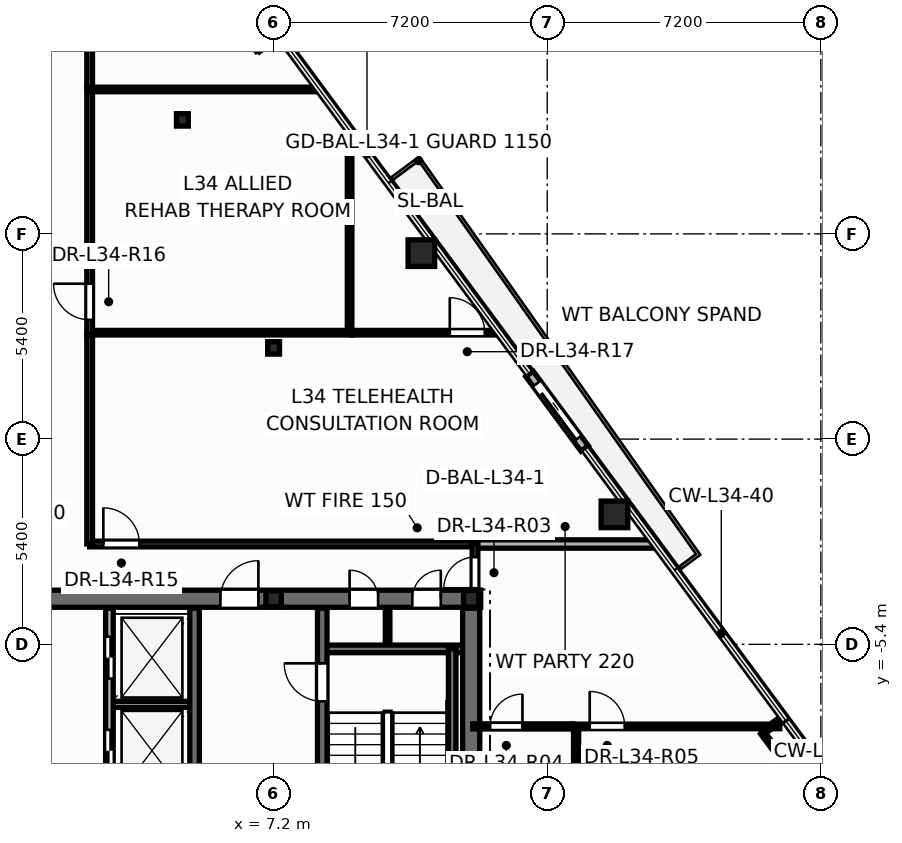
"""IFC4 building model, lengths in metres.
Left out: names, types, materials, properties, quantities, classifications, styles, units other than length and angle.
Written with IfcOpenShell. Run it as: python <this file> out.ifc"""

import sys

from ifc_helpers import new_model, si_unit, direction, frame, frame_2d, origin, origin_2d, place, context, subcontext, project, spatial, rectangle, hollow_circle, i_section, extrude, element, fill, save


model = new_model("IFC4")
c1 = context("Model", 3, precision=1e-05, world=origin(), true_north=direction((0.0, 1.0)))
c2 = subcontext(c1, "Body", "Model", "MODEL_VIEW")
j1 = project(units=[si_unit("LENGTHUNIT", "METRE"), si_unit("PLANEANGLEUNIT", "RADIAN")], contexts=[c1])
p1 = place(None, origin())
s1 = spatial("IfcSite", under=j1, at=p1, CompositionType="ELEMENT")
p2 = place(p1, origin())
s2 = spatial("IfcBuilding", under=s1, at=p2, CompositionType="ELEMENT")
p3 = place(p2, frame((0.0, 0.0, 132.9)))
s3 = spatial("IfcBuildingStorey", under=s2, at=p3, CompositionType="ELEMENT", Elevation=132.9)
for number, where, z_axis, x_axis in (
    (1, (16.169, -1.98, 0.0), (0.0, 0.0, 1.0), (1.0, 0.0, 0.0)),
    (2, (11.089, 4.894, 0.0), (0.0, 0.0, 1.0), (1.0, 0.0, 0.0)),
):
    element("IfcColumn", number, at=place(p3, frame(where, z_axis=z_axis, x_axis=x_axis)), inside=s3, PredefinedType="COLUMN", context=c2, shape_type="SweptSolid", body=[
        extrude(hollow_circle(Radius=0.35, WallThickness=0.03, at=origin_2d()), origin(), (0.0, 0.0, 1.0), 3.6),
    ])
p4 = place(p3, frame((12.4, -4.2, 0.0), z_axis=(0.0, 0.0, 1.0), x_axis=(1.0, 0.0, 0.0)))
e3 = element("IfcColumn", 3, at=p4, inside=s3, PredefinedType="COLUMN", context=c2, shape_type="SweptSolid", body=[
    extrude(i_section(OverallWidth=0.4, OverallDepth=0.44, WebThickness=0.028, FlangeThickness=0.04, at=origin_2d()), origin(), (0.0, 0.0, 1.0), 3.6),
])
p5 = place(p3, frame((7.2, -4.2, 0.0), z_axis=(0.0, 0.0, 1.0), x_axis=(1.0, 0.0, 0.0)))
e4 = element("IfcColumn", 4, at=p5, inside=s3, PredefinedType="PILASTER", context=c2, shape_type="SweptSolid", body=[
    extrude(i_section(OverallWidth=0.405, OverallDepth=0.414, WebThickness=0.022, FlangeThickness=0.032, at=origin_2d()), origin(), (0.0, 0.0, 1.0), 3.6),
])
for number, where, z_axis, x_axis in (
    (5, (7.2, 2.4, 0.0), (0.0, 0.0, 1.0), (1.0, 0.0, 0.0)),
    (6, (4.8, 8.4, 0.0), (0.0, 0.0, 1.0), (1.0, 0.0, 0.0)),
):
    element("IfcColumn", number, at=place(p3, frame(where, z_axis=z_axis, x_axis=x_axis)), inside=s3, PredefinedType="COLUMN", context=c2, shape_type="SweptSolid", body=[
        extrude(i_section(OverallWidth=0.311, OverallDepth=0.327, WebThickness=0.016, FlangeThickness=0.025, at=origin_2d()), origin(), (0.0, 0.0, 1.0), 3.6),
    ])
p6 = place(p3, frame((15.384, -0.246, -0.015), z_axis=(0.0, 0.0, 1.0), x_axis=(-0.594317914364, 0.804230201289, 0.0)))
e7 = element("IfcWall", 7, at=p6, inside=s3, PredefinedType="STANDARD", context=c2, shape_type="SweptSolid", body=[
    extrude(rectangle(XDim=2.44, YDim=0.24, at=frame_2d((1.22, 0.0))), origin(), (0.0, 0.0, 1.0), 2.807),
])
p7 = place(p6, frame((0.32, 0.0, 0.015)))
e8 = element("IfcOpeningElement", 8, at=p7, cuts=e7, PredefinedType="OPENING", context=c2, shape_type="SweptSolid", body=[
    extrude(rectangle(XDim=1.806, YDim=2.204, at=frame_2d((0.9, 1.102))), frame((0.0, 0.13, 0.0), z_axis=(0.0, -1.0, 0.0), x_axis=(1.0, 0.0, 0.0)), (0.0, 0.0, 1.0), 0.26),
])
p8 = place(p3, frame((2.88, -6.98, 0.0), z_axis=(0.0, 0.0, 1.0), x_axis=(1.0, 0.0, 0.0)))
e9 = element("IfcWall", 9, at=p8, inside=s3, PredefinedType="PARTITIONING", context=c2, shape_type="SweptSolid", body=[
    extrude(rectangle(XDim=2.24, YDim=0.16, at=frame_2d((1.12, 0.0))), origin(), (0.0, 0.0, 1.0), 3.35),
])
p9 = place(p3, frame((10.2, -5.52, 0.0), z_axis=(0.0, 0.0, 1.0), x_axis=(0.0, 1.0, 0.0)))
e10 = element("IfcWall", 10, at=p9, inside=s3, PredefinedType="PARTITIONING", context=c2, shape_type="SweptSolid", body=[
    extrude(rectangle(XDim=1.12, YDim=0.12, at=frame_2d((0.56, 0.0))), origin(), (0.0, 0.0, 1.0), 3.35),
])
p10 = place(p3, frame((-12.65, -4.2, 0.0), z_axis=(0.0, 0.0, 1.0), x_axis=(1.0, 0.0, 0.0)))
e11 = element("IfcWall", 11, at=p10, inside=s3, PredefinedType="SHEAR", context=c2, shape_type="SweptSolid", body=[
    extrude(rectangle(XDim=25.3, YDim=0.45, at=frame_2d((12.65, 0.0))), origin(), (0.0, 0.0, 1.0), 3.6),
])
p11 = place(p10, frame((1.85, 0.0, 0.0)))
e12 = element("IfcOpeningElement", 12, at=p11, cuts=e11, PredefinedType="OPENING", context=c2, shape_type="SweptSolid", body=[
    extrude(rectangle(XDim=0.756, YDim=2.054, at=frame_2d((0.375, 1.027))), frame((0.0, 0.235, 0.0), z_axis=(0.0, -1.0, 0.0), x_axis=(1.0, 0.0, 0.0)), (0.0, 0.0, 1.0), 0.47),
])
p12 = place(p10, frame((21.85, 0.0, 0.0)))
e13 = element("IfcOpeningElement", 13, at=p12, cuts=e11, PredefinedType="OPENING", context=c2, shape_type="SweptSolid", body=[
    extrude(rectangle(XDim=0.756, YDim=2.054, at=frame_2d((0.375, 1.027))), frame((0.0, 0.235, 0.0), z_axis=(0.0, -1.0, 0.0), x_axis=(1.0, 0.0, 0.0)), (0.0, 0.0, 1.0), 0.47),
])
p13 = place(p10, frame((23.5, 0.0, 0.0)))
e14 = element("IfcOpeningElement", 14, at=p13, cuts=e11, PredefinedType="OPENING", context=c2, shape_type="SweptSolid", body=[
    extrude(rectangle(XDim=0.756, YDim=2.054, at=frame_2d((0.375, 1.027))), frame((0.0, 0.235, 0.0), z_axis=(0.0, -1.0, 0.0), x_axis=(1.0, 0.0, 0.0)), (0.0, 0.0, 1.0), 0.47),
])
p14 = place(p10, frame((5.85, 0.0, 0.0)))
e15 = element("IfcOpeningElement", 15, at=p14, cuts=e11, PredefinedType="OPENING", context=c2, shape_type="SweptSolid", body=[
    extrude(rectangle(XDim=1.006, YDim=2.104, at=frame_2d((0.5, 1.052))), frame((0.0, 0.235, 0.0), z_axis=(0.0, -1.0, 0.0), x_axis=(1.0, 0.0, 0.0)), (0.0, 0.0, 1.0), 0.47),
])
p15 = place(p10, frame((10.35, 0.0, 0.0)))
e16 = element("IfcOpeningElement", 16, at=p15, cuts=e11, PredefinedType="OPENING", context=c2, shape_type="SweptSolid", body=[
    extrude(rectangle(XDim=1.406, YDim=2.154, at=frame_2d((0.7, 1.077))), frame((0.0, 0.235, 0.0), z_axis=(0.0, -1.0, 0.0), x_axis=(1.0, 0.0, 0.0)), (0.0, 0.0, 1.0), 0.47),
])
p16 = place(p10, frame((18.45, 0.0, 0.0)))
e17 = element("IfcOpeningElement", 17, at=p16, cuts=e11, PredefinedType="OPENING", context=c2, shape_type="SweptSolid", body=[
    extrude(rectangle(XDim=1.006, YDim=2.104, at=frame_2d((0.5, 1.052))), frame((0.0, 0.235, 0.0), z_axis=(0.0, -1.0, 0.0), x_axis=(1.0, 0.0, 0.0)), (0.0, 0.0, 1.0), 0.47),
])
p17 = place(p3, frame((8.48, -5.52, 0.0), z_axis=(0.0, 0.0, 1.0), x_axis=(1.0, 0.0, 0.0)))
e18 = element("IfcWall", 18, at=p17, inside=s3, PredefinedType="SOLIDWALL", context=c2, shape_type="SweptSolid", body=[
    extrude(rectangle(XDim=3.87, YDim=0.2, at=frame_2d((1.935, 0.0))), origin(), (0.0, 0.0, 1.0), 3.6),
])
p18 = place(p3, frame((11.9, -13.1, 0.0), z_axis=(0.0, 0.0, 1.0), x_axis=(0.0, 1.0, 0.0)))
e19 = element("IfcWall", 19, at=p18, inside=s3, PredefinedType="SOLIDWALL", context=c2, shape_type="SweptSolid", body=[
    extrude(rectangle(XDim=7.58, YDim=0.2, at=frame_2d((3.79, 0.0))), origin(), (0.0, 0.0, 1.0), 3.6),
])
p19 = place(p3, frame((8.48, -13.85, 0.0), z_axis=(0.0, 0.0, 1.0), x_axis=(0.0, 1.0, 0.0)))
e20 = element("IfcWall", 20, at=p19, inside=s3, PredefinedType="SHEAR", context=c2, shape_type="SweptSolid", body=[
    extrude(rectangle(XDim=9.4, YDim=0.25, at=frame_2d((4.7, 0.0))), origin(), (0.0, 0.0, 1.0), 3.6),
])
p20 = place(p19, frame((6.95, 0.0, 0.0)))
e21 = element("IfcOpeningElement", 21, at=p20, cuts=e20, PredefinedType="OPENING", context=c2, shape_type="SweptSolid", body=[
    extrude(rectangle(XDim=1.006, YDim=2.104, at=frame_2d((0.5, 1.052))), frame((0.0, 0.135, 0.0), z_axis=(0.0, -1.0, 0.0), x_axis=(1.0, 0.0, 0.0)), (0.0, 0.0, 1.0), 0.27),
])
p21 = place(p3, frame((5.12, -13.85, 0.0), z_axis=(0.0, 0.0, 1.0), x_axis=(0.0, 1.0, 0.0)))
e22 = element("IfcWall", 22, at=p21, inside=s3, PredefinedType="SHEAR", context=c2, shape_type="SweptSolid", body=[
    extrude(rectangle(XDim=9.4, YDim=0.25, at=frame_2d((4.7, 0.0))), origin(), (0.0, 0.0, 1.0), 3.6),
])
p22 = place(p3, frame((12.4, -13.85, 0.0), z_axis=(0.0, 0.0, 1.0), x_axis=(0.0, 1.0, 0.0)))
e23 = element("IfcWall", 23, at=p22, inside=s3, PredefinedType="SHEAR", context=c2, shape_type="SweptSolid", body=[
    extrude(rectangle(XDim=9.4, YDim=0.45, at=frame_2d((4.7, 0.0))), origin(), (0.0, 0.0, 1.0), 3.6),
])
p23 = place(p3, frame((2.88, -9.45, 0.0), z_axis=(0.0, 0.0, 1.0), x_axis=(0.0, 1.0, 0.0)))
e24 = element("IfcWall", 24, at=p23, inside=s3, PredefinedType="SOLIDWALL", context=c2, shape_type="SweptSolid", body=[
    extrude(rectangle(XDim=5.0, YDim=0.2, at=frame_2d((2.5, 0.0))), origin(), (0.0, 0.0, 1.0), 3.35),
])
p24 = place(p23, frame((0.7, 0.0, 0.0)))
e25 = element("IfcOpeningElement", 25, at=p24, cuts=e24, PredefinedType="OPENING", context=c2, shape_type="SweptSolid", body=[
    extrude(rectangle(XDim=1.106, YDim=2.104, at=frame_2d((0.55, 1.052))), frame((0.0, 0.11, 0.0), z_axis=(0.0, -1.0, 0.0), x_axis=(1.0, 0.0, 0.0)), (0.0, 0.0, 1.0), 0.22),
])
p25 = place(p23, frame((3.15, 0.0, 0.0)))
e26 = element("IfcOpeningElement", 26, at=p25, cuts=e24, PredefinedType="OPENING", context=c2, shape_type="SweptSolid", body=[
    extrude(rectangle(XDim=1.106, YDim=2.104, at=frame_2d((0.55, 1.052))), frame((0.0, 0.11, 0.0), z_axis=(0.0, -1.0, 0.0), x_axis=(1.0, 0.0, 0.0)), (0.0, 0.0, 1.0), 0.22),
])
p26 = place(p3, frame((2.36, -2.76, 0.0), z_axis=(0.0, 0.0, 1.0), x_axis=(1.0, 0.0, 0.0)))
e27 = element("IfcWall", 27, at=p26, inside=s3, PredefinedType="PARTITIONING", context=c2, shape_type="SweptSolid", body=[
    extrude(rectangle(XDim=10.14, YDim=0.15, at=frame_2d((5.07, 0.0))), origin(), (0.0, 0.0, 1.0), 2.325),
])
p27 = place(p26, frame((0.36, 0.0, 0.0)))
e28 = element("IfcOpeningElement", 28, at=p27, cuts=e27, PredefinedType="OPENING", context=c2, shape_type="SweptSolid", body=[
    extrude(rectangle(XDim=0.956, YDim=2.104, at=frame_2d((0.475, 1.052))), frame((0.0, 0.085, 0.0), z_axis=(0.0, -1.0, 0.0), x_axis=(1.0, 0.0, 0.0)), (0.0, 0.0, 1.0), 0.17),
])
p28 = place(p3, frame((2.36, 2.8, 0.0), z_axis=(0.0, 0.0, 1.0), x_axis=(1.0, 0.0, 0.0)))
e29 = element("IfcWall", 29, at=p28, inside=s3, PredefinedType="PARTITIONING", context=c2, shape_type="SweptSolid", body=[
    extrude(rectangle(XDim=6.9, YDim=0.12, at=frame_2d((3.45, 0.0))), origin(), (0.0, 0.0, 1.0), 2.617),
])
p29 = place(p3, frame((2.36, 2.74, 0.0), z_axis=(0.0, 0.0, 1.0), x_axis=(0.0, 1.0, 0.0)))
e30 = element("IfcWall", 30, at=p29, inside=s3, PredefinedType="PARTITIONING", context=c2, shape_type="SweptSolid", body=[
    extrude(rectangle(XDim=6.52, YDim=0.15, at=frame_2d((3.26, 0.0))), origin(), (0.0, 0.0, 1.0), 2.617),
])
p30 = place(p29, frame((0.398, 0.0, 0.0)))
e31 = element("IfcOpeningElement", 31, at=p30, cuts=e30, PredefinedType="OPENING", context=c2, shape_type="SweptSolid", body=[
    extrude(rectangle(XDim=0.956, YDim=2.104, at=frame_2d((0.475, 1.052))), frame((0.0, 0.085, 0.0), z_axis=(0.0, -1.0, 0.0), x_axis=(1.0, 0.0, 0.0)), (0.0, 0.0, 1.0), 0.17),
])
p31 = place(p3, frame((2.36, 9.2, 0.0), z_axis=(0.0, 0.0, 1.0), x_axis=(1.0, 0.0, 0.0)))
e32 = element("IfcWall", 32, at=p31, inside=s3, PredefinedType="PARTITIONING", context=c2, shape_type="SweptSolid", body=[
    extrude(rectangle(XDim=6.043, YDim=0.12, at=frame_2d((3.022, 0.0))), origin(), (0.0, 0.0, 1.0), 2.617),
])
p32 = place(p3, frame((2.36, -2.76, 0.0), z_axis=(0.0, 0.0, 1.0), x_axis=(0.0, 1.0, 0.0)))
e33 = element("IfcWall", 33, at=p32, inside=s3, PredefinedType="PARTITIONING", context=c2, shape_type="SweptSolid", body=[
    extrude(rectangle(XDim=5.498, YDim=0.15, at=frame_2d((2.749, 0.0))), origin(), (0.0, 0.0, 1.0), 2.325),
])
p33 = place(p3, frame((15.08, -7.56, 0.0), z_axis=(0.0, 0.0, 1.0), x_axis=(1.0, 0.0, 0.0)))
e34 = element("IfcWall", 34, at=p33, inside=s3, PredefinedType="PARTITIONING", context=c2, shape_type="SweptSolid", body=[
    extrude(rectangle(XDim=5.44, YDim=0.12, at=frame_2d((2.72, 0.0))), origin(), (0.0, 0.0, 1.0), 2.325),
])
p34 = place(p33, frame((0.438, 0.0, 0.0)))
e35 = element("IfcOpeningElement", 35, at=p34, cuts=e34, PredefinedType="OPENING", context=c2, shape_type="SweptSolid", body=[
    extrude(rectangle(XDim=0.926, YDim=2.104, at=frame_2d((0.46, 1.052))), frame((0.0, 0.07, 0.0), z_axis=(0.0, -1.0, 0.0), x_axis=(1.0, 0.0, 0.0)), (0.0, 0.0, 1.0), 0.14),
])
p35 = place(p3, frame((9.2, 2.8, 0.0), z_axis=(0.0, 0.0, 1.0), x_axis=(0.0, 1.0, 0.0)))
e36 = element("IfcWall", 36, at=p35, inside=s3, PredefinedType="PARTITIONING", context=c2, shape_type="SweptSolid", body=[
    extrude(rectangle(XDim=5.322, YDim=0.12, at=frame_2d((2.661, 0.0))), origin(), (0.0, 0.0, 1.0), 2.617),
])
p36 = place(p3, frame((12.5, -2.76, 0.0), z_axis=(0.0, 0.0, 1.0), x_axis=(1.0, 0.0, 0.0)))
e37 = element("IfcWall", 37, at=p36, inside=s3, PredefinedType="PARTITIONING", context=c2, shape_type="SweptSolid", body=[
    extrude(rectangle(XDim=4.743, YDim=0.22, at=frame_2d((2.371, 0.0))), origin(), (0.0, 0.0, 1.0), 2.792),
])
p37 = place(p3, frame((2.36, 9.262, 0.0), z_axis=(0.0, 0.0, 1.0), x_axis=(0.0, 1.0, 0.0)))
e38 = element("IfcWall", 38, at=p37, inside=s3, PredefinedType="PARTITIONING", context=c2, shape_type="SweptSolid", body=[
    extrude(rectangle(XDim=4.052, YDim=0.15, at=frame_2d((2.026, 0.0))), origin(), (0.0, 0.0, 1.0), 2.792),
])
p38 = place(p3, frame((9.262, 2.8, 0.0), z_axis=(0.0, 0.0, 1.0), x_axis=(1.0, 0.0, 0.0)))
e39 = element("IfcWall", 39, at=p38, inside=s3, PredefinedType="PARTITIONING", context=c2, shape_type="SweptSolid", body=[
    extrude(rectangle(XDim=3.872, YDim=0.12, at=frame_2d((1.936, 0.0))), origin(), (0.0, 0.0, 1.0), 2.792),
])
p39 = place(p38, frame((2.574, 0.0, 0.0)))
e40 = element("IfcOpeningElement", 40, at=p39, cuts=e39, PredefinedType="OPENING", context=c2, shape_type="SweptSolid", body=[
    extrude(rectangle(XDim=0.926, YDim=2.104, at=frame_2d((0.46, 1.052))), frame((0.0, 0.07, 0.0), z_axis=(0.0, -1.0, 0.0), x_axis=(1.0, 0.0, 0.0)), (0.0, 0.0, 1.0), 0.14),
])
p40 = place(p3, frame((12.44, -7.56, 0.0), z_axis=(0.0, 0.0, 1.0), x_axis=(1.0, 0.0, 0.0)))
e41 = element("IfcWall", 41, at=p40, inside=s3, PredefinedType="PARTITIONING", context=c2, shape_type="SweptSolid", body=[
    extrude(rectangle(XDim=2.638, YDim=0.135, at=frame_2d((1.319, 0.0))), origin(), (0.0, 0.0, 1.0), 2.792),
])
p41 = place(p40, frame((0.458, 0.0, 0.0)))
e42 = element("IfcOpeningElement", 42, at=p41, cuts=e41, PredefinedType="OPENING", context=c2, shape_type="SweptSolid", body=[
    extrude(rectangle(XDim=0.856, YDim=2.104, at=frame_2d((0.425, 1.052))), frame((0.0, 0.078, 0.0), z_axis=(0.0, -1.0, 0.0), x_axis=(1.0, 0.0, 0.0)), (0.0, 0.0, 1.0), 0.155),
])
p42 = place(p3, frame((15.16, -10.3, 0.0), z_axis=(0.0, 0.0, 1.0), x_axis=(0.0, 1.0, 0.0)))
e43 = element("IfcWall", 43, at=p42, inside=s3, PredefinedType="PARTITIONING", context=c2, shape_type="SweptSolid", body=[
    extrude(rectangle(XDim=2.74, YDim=0.135, at=frame_2d((1.37, 0.0))), origin(), (0.0, 0.0, 1.0), 3.35),
])
p43 = place(p3, frame((21.464, -9.615, 0.0), z_axis=(0.0, 0.0, 1.0), x_axis=(-0.594385220585, 0.804180458324, 0.0)))
e44 = element("IfcWall", 44, at=p43, inside=s3, PredefinedType="PARTITIONING", context=c2, shape_type="SweptSolid", body=[
    extrude(rectangle(XDim=2.351, YDim=0.12, at=frame_2d((1.175, 0.0))), origin(), (0.0, 0.0, 1.0), 2.325),
])
p44 = place(p3, frame((12.5, -4.24, 0.0), z_axis=(0.0, 0.0, 1.0), x_axis=(0.0, 1.0, 0.0)))
e45 = element("IfcWall", 45, at=p44, inside=s3, PredefinedType="PARTITIONING", context=c2, shape_type="SweptSolid", body=[
    extrude(rectangle(XDim=1.48, YDim=0.15, at=frame_2d((0.74, 0.0))), origin(), (0.0, 0.0, 1.0), 2.325),
])
p45 = place(p44, frame((0.315, 0.0, 0.0)))
e46 = element("IfcOpeningElement", 46, at=p45, cuts=e45, PredefinedType="OPENING", context=c2, shape_type="SweptSolid", body=[
    extrude(rectangle(XDim=0.826, YDim=2.104, at=frame_2d((0.41, 1.052))), frame((0.0, 0.085, 0.0), z_axis=(0.0, -1.0, 0.0), x_axis=(1.0, 0.0, 0.0)), (0.0, 0.0, 1.0), 0.17),
])
p46 = place(p3, frame((20.066, -7.725, 0.0), z_axis=(0.0, 0.0, 1.0), x_axis=(0.804047409182, 0.594565188847, 0.0)))
e47 = element("IfcWall", 47, at=p46, inside=s3, PredefinedType="PARTITIONING", context=c2, shape_type="SweptSolid", body=[
    extrude(rectangle(XDim=0.67, YDim=0.12, at=frame_2d((0.335, 0.0))), origin(), (0.0, 0.0, 1.0), 2.792),
])
p47 = place(p7, origin())
e48 = element("IfcDoor", 48, at=p47, inside=s3, OperationType="SLIDING_TO_LEFT", PredefinedType="DOOR", context=c2, shape_type="SweptSolid", body=[
    extrude(rectangle(XDim=1.8, YDim=2.2, at=frame_2d((0.9, 1.1))), frame((0.0, 0.025, 0.0), z_axis=(0.0, -1.0, 0.0), x_axis=(1.0, 0.0, 0.0)), (0.0, 0.0, 1.0), 0.05),
])
fill(e8, e48)
p48 = place(p24, origin())
e49 = element("IfcDoor", 49, at=p48, inside=s3, OperationType="DOUBLE_DOOR_SLIDING", PredefinedType="DOOR", context=c2, shape_type="SweptSolid", body=[
    extrude(rectangle(XDim=1.1, YDim=2.1, at=frame_2d((0.55, 1.05))), frame((0.0, 0.025, 0.0), z_axis=(0.0, -1.0, 0.0), x_axis=(1.0, 0.0, 0.0)), (0.0, 0.0, 1.0), 0.05),
])
fill(e25, e49)
p49 = place(p25, origin())
e50 = element("IfcDoor", 50, at=p49, inside=s3, OperationType="DOUBLE_DOOR_SLIDING", PredefinedType="DOOR", context=c2, shape_type="SweptSolid", body=[
    extrude(rectangle(XDim=1.1, YDim=2.1, at=frame_2d((0.55, 1.05))), frame((0.0, 0.025, 0.0), z_axis=(0.0, -1.0, 0.0), x_axis=(1.0, 0.0, 0.0)), (0.0, 0.0, 1.0), 0.05),
])
fill(e26, e50)
p50 = place(p20, origin())
e51 = element("IfcDoor", 51, at=p50, inside=s3, OperationType="SINGLE_SWING_RIGHT", PredefinedType="DOOR", context=c2, shape_type="SweptSolid", body=[
    extrude(rectangle(XDim=1.0, YDim=2.1, at=frame_2d((0.5, 1.05))), frame((0.0, 0.025, 0.0), z_axis=(0.0, -1.0, 0.0), x_axis=(1.0, 0.0, 0.0)), (0.0, 0.0, 1.0), 0.05),
])
fill(e21, e51)
p51 = place(p12, origin())
e52 = element("IfcDoor", 52, at=p51, inside=s3, OperationType="SINGLE_SWING_LEFT", PredefinedType="DOOR", context=c2, shape_type="SweptSolid", body=[
    extrude(rectangle(XDim=0.75, YDim=2.05, at=frame_2d((0.375, 1.025))), frame((0.0, 0.025, 0.0), z_axis=(0.0, -1.0, 0.0), x_axis=(1.0, 0.0, 0.0)), (0.0, 0.0, 1.0), 0.05),
])
fill(e13, e52)
p52 = place(p13, origin())
e53 = element("IfcDoor", 53, at=p52, inside=s3, OperationType="SINGLE_SWING_RIGHT", PredefinedType="DOOR", context=c2, shape_type="SweptSolid", body=[
    extrude(rectangle(XDim=0.75, YDim=2.05, at=frame_2d((0.375, 1.025))), frame((0.0, 0.025, 0.0), z_axis=(0.0, -1.0, 0.0), x_axis=(1.0, 0.0, 0.0)), (0.0, 0.0, 1.0), 0.05),
])
fill(e14, e53)
p53 = place(p16, origin())
e54 = element("IfcDoor", 54, at=p53, inside=s3, OperationType="SINGLE_SWING_RIGHT", PredefinedType="DOOR", context=c2, shape_type="SweptSolid", body=[
    extrude(rectangle(XDim=1.0, YDim=2.1, at=frame_2d((0.5, 1.05))), frame((0.0, 0.025, 0.0), z_axis=(0.0, -1.0, 0.0), x_axis=(1.0, 0.0, 0.0)), (0.0, 0.0, 1.0), 0.05),
])
fill(e17, e54)
p54 = place(p45, origin())
e55 = element("IfcDoor", 55, at=p54, inside=s3, OperationType="SINGLE_SWING_LEFT", PredefinedType="DOOR", context=c2, shape_type="SweptSolid", body=[
    extrude(rectangle(XDim=0.82, YDim=2.1, at=frame_2d((0.41, 1.05))), frame((0.0, 0.025, 0.0), z_axis=(0.0, -1.0, 0.0), x_axis=(1.0, 0.0, 0.0)), (0.0, 0.0, 1.0), 0.05),
])
fill(e46, e55)
p55 = place(p41, origin())
e56 = element("IfcDoor", 56, at=p55, inside=s3, OperationType="SINGLE_SWING_RIGHT", PredefinedType="DOOR", context=c2, shape_type="SweptSolid", body=[
    extrude(rectangle(XDim=0.85, YDim=2.1, at=frame_2d((0.425, 1.05))), frame((0.0, 0.025, 0.0), z_axis=(0.0, -1.0, 0.0), x_axis=(1.0, 0.0, 0.0)), (0.0, 0.0, 1.0), 0.05),
])
fill(e42, e56)
p56 = place(p34, origin())
e57 = element("IfcDoor", 57, at=p56, inside=s3, OperationType="SINGLE_SWING_LEFT", PredefinedType="DOOR", context=c2, shape_type="SweptSolid", body=[
    extrude(rectangle(XDim=0.92, YDim=2.1, at=frame_2d((0.46, 1.05))), frame((0.0, 0.025, 0.0), z_axis=(0.0, -1.0, 0.0), x_axis=(1.0, 0.0, 0.0)), (0.0, 0.0, 1.0), 0.05),
])
fill(e35, e57)
p57 = place(p27, origin())
e58 = element("IfcDoor", 58, at=p57, inside=s3, OperationType="SINGLE_SWING_LEFT", PredefinedType="DOOR", context=c2, shape_type="SweptSolid", body=[
    extrude(rectangle(XDim=0.95, YDim=2.1, at=frame_2d((0.475, 1.05))), frame((0.0, 0.025, 0.0), z_axis=(0.0, -1.0, 0.0), x_axis=(1.0, 0.0, 0.0)), (0.0, 0.0, 1.0), 0.05),
])
fill(e28, e58)
p58 = place(p30, origin())
e59 = element("IfcDoor", 59, at=p58, inside=s3, OperationType="SINGLE_SWING_RIGHT", PredefinedType="DOOR", context=c2, shape_type="SweptSolid", body=[
    extrude(rectangle(XDim=0.95, YDim=2.1, at=frame_2d((0.475, 1.05))), frame((0.0, 0.025, 0.0), z_axis=(0.0, -1.0, 0.0), x_axis=(1.0, 0.0, 0.0)), (0.0, 0.0, 1.0), 0.05),
])
fill(e31, e59)
p59 = place(p39, origin())
e60 = element("IfcDoor", 60, at=p59, inside=s3, OperationType="SINGLE_SWING_LEFT", PredefinedType="DOOR", context=c2, shape_type="SweptSolid", body=[
    extrude(rectangle(XDim=0.92, YDim=2.1, at=frame_2d((0.46, 1.05))), frame((0.0, 0.025, 0.0), z_axis=(0.0, -1.0, 0.0), x_axis=(1.0, 0.0, 0.0)), (0.0, 0.0, 1.0), 0.05),
])
fill(e40, e60)
save(model, sys.argv[1])
